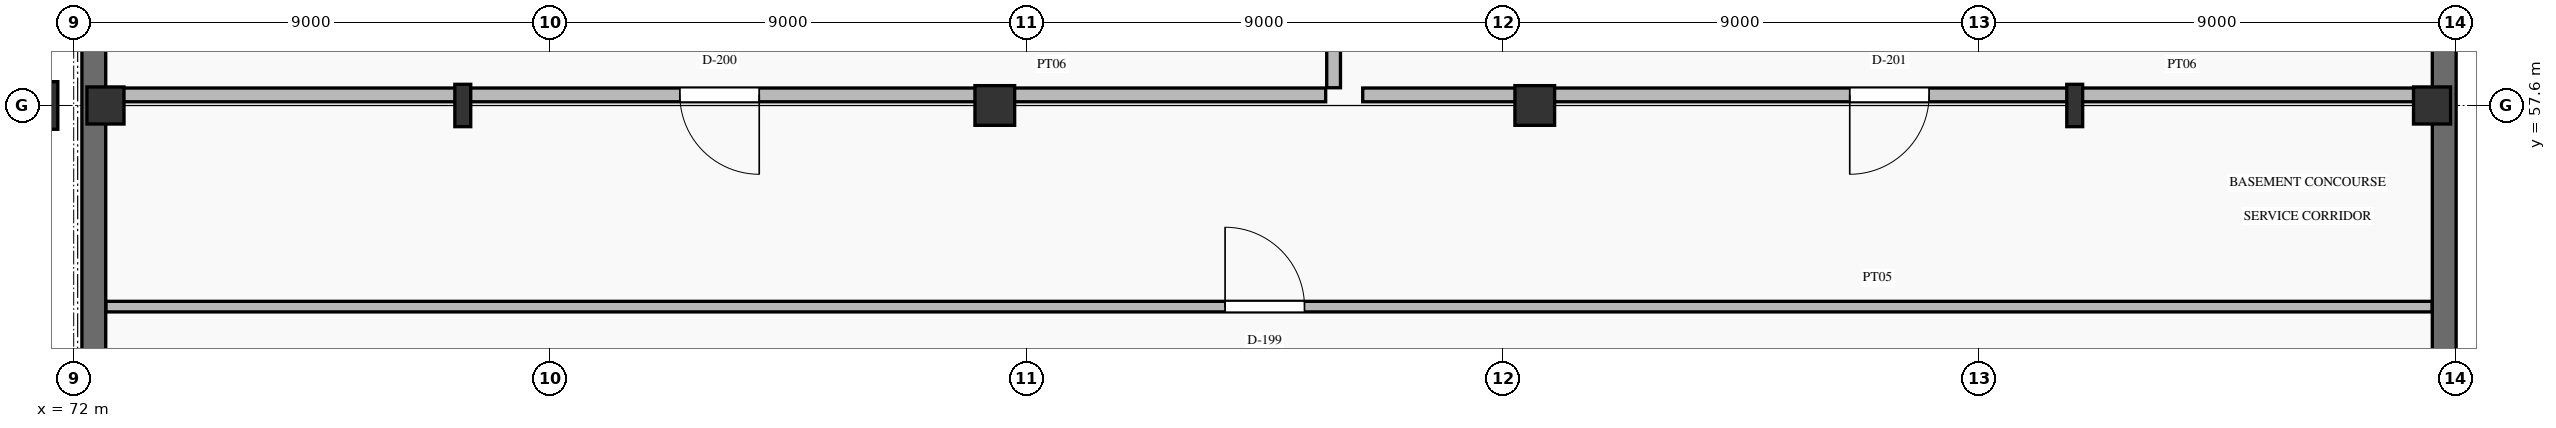
"""IFC4 building model, lengths in metres.
Left out: names, types, materials, properties, quantities, classifications, styles, units other than length and angle.
Written with IfcOpenShell. Run it as: python <this file> out.ifc"""

import sys

from ifc_helpers import new_model, si_unit, direction, frame, frame_2d, origin, origin_2d, place, context, subcontext, project, spatial, rectangle, i_section, extrude, element, fill, save


model = new_model("IFC4")
c1 = context("Model", 3, precision=1e-05, world=origin(), true_north=direction((0.0, 1.0)))
c2 = subcontext(c1, "Body", "Model", "MODEL_VIEW")
j1 = project(units=[si_unit("LENGTHUNIT", "METRE"), si_unit("PLANEANGLEUNIT", "RADIAN")], contexts=[c1])
p1 = place(None, origin())
s1 = spatial("IfcSite", under=j1, at=p1, CompositionType="ELEMENT")
p2 = place(p1, origin())
s2 = spatial("IfcBuilding", under=s1, at=p2, CompositionType="ELEMENT")
p3 = place(p2, frame((0.0, 0.0, -4.5)))
s3 = spatial("IfcBuildingStorey", under=s2, at=p3, CompositionType="ELEMENT", Elevation=-4.5)
p4 = place(p3, frame((71.55, 57.6, 0.0), z_axis=(0.0, 0.0, 1.0), x_axis=(1.0, 0.0, 0.0)))
e1 = element("IfcColumn", 1, at=p4, inside=s3, PredefinedType="COLUMN", context=c2, shape_type="SweptSolid", body=[
    extrude(i_section(OverallWidth=0.3, OverallDepth=0.9, WebThickness=0.019, FlangeThickness=0.035, FilletRadius=0.03, at=origin_2d()), origin(), (0.0, 0.0, 1.0), 4.5),
])
for number, where, z_axis, x_axis in (
    (2, (72.6, 57.6, 0.0), (0.0, 0.0, 1.0), (1.0, 0.0, 0.0)),
    (3, (116.55, 57.6, 0.0), (0.0, 0.0, 1.0), (1.0, 0.0, 0.0)),
):
    element("IfcColumn", number, at=place(p3, frame(where, z_axis=z_axis, x_axis=x_axis)), inside=s3, PredefinedType="COLUMN", context=c2, shape_type="SweptSolid", body=[
        extrude(rectangle(XDim=0.7, YDim=0.7, at=origin_2d()), origin(), (0.0, 0.0, 1.0), 4.5),
    ])
for number, where, z_axis, x_axis in (
    (4, (79.35, 57.6, 0.0), (0.0, 0.0, 1.0), (1.0, 0.0, 0.0)),
    (5, (109.8, 57.6, 0.0), (0.0, 0.0, 1.0), (1.0, 0.0, 0.0)),
):
    element("IfcColumn", number, at=place(p3, frame(where, z_axis=z_axis, x_axis=x_axis)), inside=s3, PredefinedType="COLUMN", context=c2, shape_type="SweptSolid", body=[
        extrude(i_section(OverallWidth=0.3, OverallDepth=0.8, WebThickness=0.018, FlangeThickness=0.033, FilletRadius=0.03, at=origin_2d()), origin(), (0.0, 0.0, 1.0), 4.5),
    ])
for number, where, z_axis, x_axis in (
    (6, (89.4, 57.6, 0.0), (0.0, 0.0, 1.0), (1.0, 0.0, 0.0)),
    (7, (99.6, 57.6, 0.0), (0.0, 0.0, 1.0), (1.0, 0.0, 0.0)),
):
    element("IfcColumn", number, at=place(p3, frame(where, z_axis=z_axis, x_axis=x_axis)), inside=s3, PredefinedType="COLUMN", context=c2, shape_type="SweptSolid", body=[
        extrude(rectangle(XDim=0.75, YDim=0.75, at=origin_2d()), origin(), (0.0, 0.0, 1.0), 4.5),
    ])
for number, where, z_axis, x_axis in (
    (8, (116.78, 29.02, 0.0), (0.0, 0.0, 1.0), (0.0, 1.0, 0.0)),
    (9, (72.38, 95.78, 0.0), (0.0, 0.0, 1.0), (0.0, -1.0, 0.0)),
):
    element("IfcWall", number, at=place(p3, frame(where, z_axis=z_axis, x_axis=x_axis)), inside=s3, PredefinedType="SHEAR", context=c2, shape_type="SweptSolid", body=[
        extrude(rectangle(XDim=66.76, YDim=0.45, at=frame_2d((33.38, 0.0))), origin(), (0.0, 0.0, 1.0), 4.2),
    ])
p5 = place(p3, frame((72.61, 53.8, 0.0), z_axis=(0.0, 0.0, 1.0), x_axis=(1.0, 0.0, 0.0)))
e10 = element("IfcWall", 10, at=p5, inside=s3, PredefinedType="PARTITIONING", context=c2, shape_type="SweptSolid", body=[
    extrude(rectangle(XDim=43.94, YDim=0.2, at=frame_2d((21.97, 0.0))), origin(), (0.0, 0.0, 1.0), 4.2),
])
p6 = place(p5, frame((21.14, 0.0, 0.0)))
e11 = element("IfcOpeningElement", 11, at=p6, cuts=e10, PredefinedType="OPENING", context=c2, shape_type="SweptSolid", body=[
    extrude(rectangle(XDim=1.5, YDim=2.25, at=frame_2d((0.75, 1.125))), frame((0.0, 0.115, 0.0), z_axis=(0.0, -1.0, 0.0), x_axis=(1.0, 0.0, 0.0)), (0.0, 0.0, 1.0), 0.23),
])
p7 = place(p3, frame((72.75, 57.8, 0.0), z_axis=(0.0, 0.0, 1.0), x_axis=(1.0, 0.0, 0.0)))
e12 = element("IfcWall", 12, at=p7, inside=s3, PredefinedType="PARTITIONING", context=c2, shape_type="SweptSolid", body=[
    extrude(rectangle(XDim=22.9, YDim=0.26, at=frame_2d((11.45, 0.0))), origin(), (0.0, 0.0, 1.0), 3.3),
])
p8 = place(p7, frame((10.7, 0.0, 0.0)))
e13 = element("IfcOpeningElement", 13, at=p8, cuts=e12, PredefinedType="OPENING", context=c2, shape_type="SweptSolid", body=[
    extrude(rectangle(XDim=1.5, YDim=2.25, at=frame_2d((0.75, 1.125))), frame((0.0, 0.145, 0.0), z_axis=(0.0, -1.0, 0.0), x_axis=(1.0, 0.0, 0.0)), (0.0, 0.0, 1.0), 0.29),
])
p9 = place(p3, frame((96.35, 57.8, 0.0), z_axis=(0.0, 0.0, 1.0), x_axis=(1.0, 0.0, 0.0)))
e14 = element("IfcWall", 14, at=p9, inside=s3, PredefinedType="PARTITIONING", context=c2, shape_type="SweptSolid", body=[
    extrude(rectangle(XDim=19.9, YDim=0.26, at=frame_2d((9.95, 0.0))), origin(), (0.0, 0.0, 1.0), 3.3),
])
p10 = place(p9, frame((9.2, 0.0, 0.0)))
e15 = element("IfcOpeningElement", 15, at=p10, cuts=e14, PredefinedType="OPENING", context=c2, shape_type="SweptSolid", body=[
    extrude(rectangle(XDim=1.5, YDim=2.25, at=frame_2d((0.75, 1.125))), frame((0.0, 0.145, 0.0), z_axis=(0.0, -1.0, 0.0), x_axis=(1.0, 0.0, 0.0)), (0.0, 0.0, 1.0), 0.29),
])
p11 = place(p3, frame((95.8, 57.935, 0.0), z_axis=(0.0, 0.0, 1.0), x_axis=(0.0, 1.0, 0.0)))
e16 = element("IfcWall", 16, at=p11, inside=s3, PredefinedType="PARTITIONING", context=c2, shape_type="SweptSolid", body=[
    extrude(rectangle(XDim=27.815, YDim=0.26, at=frame_2d((13.907, 0.0))), origin(), (0.0, 0.0, 1.0), 4.2),
])
p12 = place(p6, origin())
e17 = element("IfcDoor", 17, at=p12, inside=s3, OperationType="SINGLE_SWING_LEFT", PredefinedType="DOOR", context=c2, shape_type="SweptSolid", body=[
    extrude(rectangle(XDim=1.5, YDim=2.25, at=frame_2d((0.75, 1.125))), frame((0.0, 0.025, 0.0), z_axis=(0.0, -1.0, 0.0), x_axis=(1.0, 0.0, 0.0)), (0.0, 0.0, 1.0), 0.05),
])
fill(e11, e17)
p13 = place(p8, frame((1.5, 0.0, 0.0), z_axis=(0.0, 0.0, 1.0), x_axis=(-1.0, 0.0, 0.0)))
e18 = element("IfcDoor", 18, at=p13, inside=s3, OperationType="SINGLE_SWING_RIGHT", PredefinedType="DOOR", context=c2, shape_type="SweptSolid", body=[
    extrude(rectangle(XDim=1.5, YDim=2.25, at=frame_2d((0.75, 1.125))), frame((0.0, 0.025, 0.0), z_axis=(0.0, -1.0, 0.0), x_axis=(1.0, 0.0, 0.0)), (0.0, 0.0, 1.0), 0.05),
])
fill(e13, e18)
p14 = place(p10, frame((1.5, 0.0, 0.0), z_axis=(0.0, 0.0, 1.0), x_axis=(-1.0, 0.0, 0.0)))
e19 = element("IfcDoor", 19, at=p14, inside=s3, OperationType="SINGLE_SWING_LEFT", PredefinedType="DOOR", context=c2, shape_type="SweptSolid", body=[
    extrude(rectangle(XDim=1.5, YDim=2.25, at=frame_2d((0.75, 1.125))), frame((0.0, 0.025, 0.0), z_axis=(0.0, -1.0, 0.0), x_axis=(1.0, 0.0, 0.0)), (0.0, 0.0, 1.0), 0.05),
])
fill(e15, e19)
save(model, sys.argv[1])
